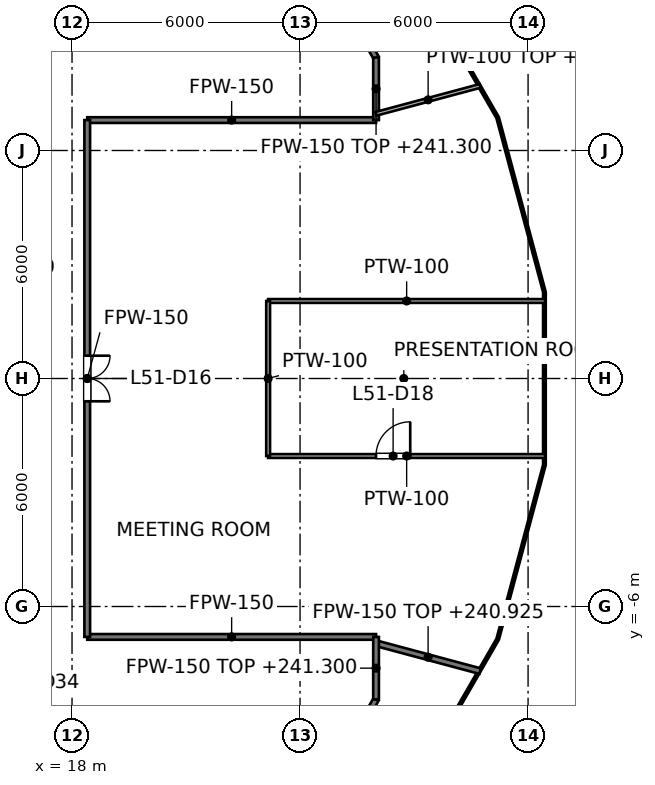
"""IFC4 building model, lengths in metres.
Left out: names, types, materials, properties, quantities, classifications, styles, units other than length and angle.
Written with IfcOpenShell. Run it as: python <this file> out.ifc"""

import sys

from ifc_helpers import new_model, si_unit, direction, frame, frame_2d, origin, place, context, subcontext, project, spatial, rectangle, extrude, element, fill, save


model = new_model("IFC4")
c1 = context("Model", 3, precision=1e-05, world=origin(), true_north=direction((0.0, 1.0)))
c2 = subcontext(c1, "Body", "Model", "MODEL_VIEW")
j1 = project(units=[si_unit("LENGTHUNIT", "METRE"), si_unit("PLANEANGLEUNIT", "RADIAN")], contexts=[c1])
p1 = place(None, origin())
s1 = spatial("IfcSite", under=j1, at=p1, CompositionType="ELEMENT")
p2 = place(p1, origin())
s2 = spatial("IfcBuilding", under=s1, at=p2, CompositionType="ELEMENT")
p3 = place(p2, frame((0.0, 0.0, 237.6)))
s3 = spatial("IfcBuildingStorey", under=s2, at=p3, CompositionType="ELEMENT", Elevation=237.6)
p4 = place(p3, frame((25.333, 9.6, 0.0), z_axis=(0.0, 0.0, 1.0), x_axis=(0.500076310463, -0.865981341435, 0.0)))
e1 = element("IfcWall", 1, at=p4, inside=s3, PredefinedType="PARTITIONING", context=c2, shape_type="SweptSolid", body=[
    extrude(rectangle(XDim=1.334, YDim=0.15, at=frame_2d((0.667, 0.0))), origin(), (0.0, 0.0, 1.0), 2.768),
])
p5 = place(p3, frame((26.0, -6.967, 0.0), z_axis=(0.0, 0.0, 1.0), x_axis=(0.965928451997, -0.258809245628, 0.0)))
e2 = element("IfcWall", 2, at=p5, inside=s3, PredefinedType="PARTITIONING", context=c2, shape_type="SweptSolid", body=[
    extrude(rectangle(XDim=2.836, YDim=0.15, at=frame_2d((1.418, 0.0))), origin(), (0.0, 0.0, 1.0), 3.325),
])
for number, where, z_axis, x_axis in (
    (3, (18.4, -6.8, 0.0), (0.0, 0.0, 1.0), (1.0, 0.0, 0.0)),
    (4, (18.4, 6.8, 0.0), (0.0, 0.0, 1.0), (1.0, 0.0, 0.0)),
):
    element("IfcWall", number, at=place(p3, frame(where, z_axis=z_axis, x_axis=x_axis)), inside=s3, PredefinedType="PARTITIONING", context=c2, shape_type="SweptSolid", body=[
        extrude(rectangle(XDim=7.6, YDim=0.15, at=frame_2d((3.8, 0.0))), origin(), (0.0, 0.0, 1.0), 2.768),
    ])
p6 = place(p3, frame((25.333, -9.6, 0.0), z_axis=(0.0, 0.0, 1.0), x_axis=(0.500076310463, 0.865981341435, 0.0)))
e5 = element("IfcWall", 5, at=p6, inside=s3, PredefinedType="PARTITIONING", context=c2, shape_type="SweptSolid", body=[
    extrude(rectangle(XDim=1.334, YDim=0.15, at=frame_2d((0.667, 0.0))), origin(), (0.0, 0.0, 1.0), 2.768),
])
for number, where, z_axis, x_axis in (
    (6, (26.0, -8.445, 0.0), (0.0, 0.0, 1.0), (0.0, 1.0, 0.0)),
    (7, (26.0, 6.8, 0.0), (0.0, 0.0, 1.0), (0.0, 1.0, 0.0)),
):
    element("IfcWall", number, at=place(p3, frame(where, z_axis=z_axis, x_axis=x_axis)), inside=s3, PredefinedType="PARTITIONING", context=c2, shape_type="SweptSolid", body=[
        extrude(rectangle(XDim=1.645, YDim=0.15, at=frame_2d((0.823, 0.0))), origin(), (0.0, 0.0, 1.0), 3.7),
    ])
p7 = place(p3, frame((18.4, -6.8, 0.0), z_axis=(0.0, 0.0, 1.0), x_axis=(0.0, 1.0, 0.0)))
e8 = element("IfcWall", 8, at=p7, inside=s3, PredefinedType="PARTITIONING", context=c2, shape_type="SweptSolid", body=[
    extrude(rectangle(XDim=13.6, YDim=0.15, at=frame_2d((6.8, 0.0))), origin(), (0.0, 0.0, 1.0), 2.768),
])
p8 = place(p7, frame((6.2, 0.0, 0.0)))
e9 = element("IfcOpeningElement", 9, at=p8, cuts=e8, PredefinedType="OPENING", context=c2, shape_type="SweptSolid", body=[
    extrude(rectangle(XDim=1.2, YDim=2.1, at=frame_2d((0.6, 1.05))), frame((0.0, 0.075, 0.0), z_axis=(0.0, -1.0, 0.0), x_axis=(1.0, 0.0, 0.0)), (0.0, 0.0, 1.0), 0.15),
])
p9 = place(p3, frame((23.16, -2.04, 0.0), z_axis=(0.0, 0.0, 1.0), x_axis=(1.0, 0.0, 0.0)))
e10 = element("IfcWall", 10, at=p9, inside=s3, PredefinedType="PARTITIONING", context=c2, shape_type="SweptSolid", body=[
    extrude(rectangle(XDim=7.29, YDim=0.1, at=frame_2d((3.645, 0.0))), origin(), (0.0, 0.0, 1.0), 2.768),
])
p10 = place(p9, frame((2.839, 0.0, 0.0)))
e11 = element("IfcOpeningElement", 11, at=p10, cuts=e10, PredefinedType="OPENING", context=c2, shape_type="SweptSolid", body=[
    extrude(rectangle(XDim=0.9, YDim=2.1, at=frame_2d((0.45, 1.05))), frame((0.0, 0.05, 0.0), z_axis=(0.0, -1.0, 0.0), x_axis=(1.0, 0.0, 0.0)), (0.0, 0.0, 1.0), 0.1),
])
p11 = place(p3, frame((23.16, 2.04, 0.0), z_axis=(0.0, 0.0, 1.0), x_axis=(1.0, 0.0, 0.0)))
e12 = element("IfcWall", 12, at=p11, inside=s3, PredefinedType="PARTITIONING", context=c2, shape_type="SweptSolid", body=[
    extrude(rectangle(XDim=7.29, YDim=0.1, at=frame_2d((3.645, 0.0))), origin(), (0.0, 0.0, 1.0), 2.768),
])
p12 = place(p3, frame((26.0, 6.966, 0.0), z_axis=(0.0, 0.0, 1.0), x_axis=(0.965951508514, 0.258723178704, 0.0)))
e13 = element("IfcWall", 13, at=p12, inside=s3, PredefinedType="PARTITIONING", context=c2, shape_type="SweptSolid", body=[
    extrude(rectangle(XDim=2.837, YDim=0.1, at=frame_2d((1.418, 0.0))), origin(), (0.0, 0.0, 1.0), 3.325),
])
p13 = place(p3, frame((23.16, -2.04, 0.0), z_axis=(0.0, 0.0, 1.0), x_axis=(0.0, 1.0, 0.0)))
e14 = element("IfcWall", 14, at=p13, inside=s3, PredefinedType="PARTITIONING", context=c2, shape_type="SweptSolid", body=[
    extrude(rectangle(XDim=4.08, YDim=0.1, at=frame_2d((2.04, 0.0))), origin(), (0.0, 0.0, 1.0), 2.768),
])
p14 = place(p8, origin())
e15 = element("IfcDoor", 15, at=p14, inside=s3, OperationType="DOUBLE_DOOR_SINGLE_SWING", PredefinedType="DOOR", context=c2, shape_type="SweptSolid", body=[
    extrude(rectangle(XDim=1.2, YDim=2.1, at=frame_2d((0.6, 1.05))), frame((0.0, 0.025, 0.0), z_axis=(0.0, -1.0, 0.0), x_axis=(1.0, 0.0, 0.0)), (0.0, 0.0, 1.0), 0.05),
])
fill(e9, e15)
p15 = place(p10, origin())
e16 = element("IfcDoor", 16, at=p15, inside=s3, OperationType="SINGLE_SWING_RIGHT", PredefinedType="DOOR", context=c2, shape_type="SweptSolid", body=[
    extrude(rectangle(XDim=0.9, YDim=2.1, at=frame_2d((0.45, 1.05))), frame((0.0, 0.025, 0.0), z_axis=(0.0, -1.0, 0.0), x_axis=(1.0, 0.0, 0.0)), (0.0, 0.0, 1.0), 0.05),
])
fill(e11, e16)
save(model, sys.argv[1])
